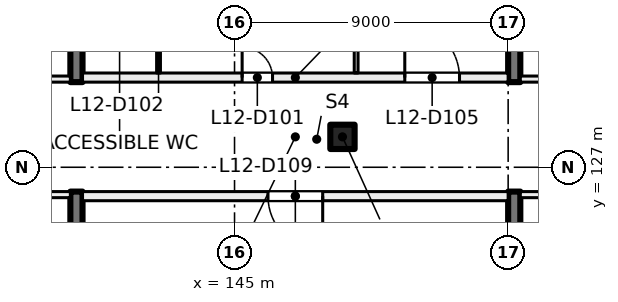
"""IFC4 building model, lengths in metres.
Left out: names, types, materials, properties, quantities, classifications, styles, units other than length and angle.
Written with IfcOpenShell. Run it as: python <this file> out.ifc"""

import sys

from ifc_helpers import new_model, si_unit, direction, frame, frame_2d, origin, origin_2d, place, context, subcontext, project, spatial, rectangle, extrude, element, fill, save


model = new_model("IFC4")
c1 = context("Model", 3, precision=1e-05, world=origin(), true_north=direction((0.0, 1.0)))
c2 = subcontext(c1, "Body", "Model", "MODEL_VIEW")
j1 = project(units=[si_unit("LENGTHUNIT", "METRE"), si_unit("PLANEANGLEUNIT", "RADIAN")], contexts=[c1])
p1 = place(None, origin())
s1 = spatial("IfcSite", under=j1, at=p1, CompositionType="ELEMENT")
p2 = place(p1, origin())
s2 = spatial("IfcBuilding", under=s1, at=p2, CompositionType="ELEMENT")
p3 = place(p2, frame((0.0, 0.0, 55.5)))
s3 = spatial("IfcBuildingStorey", under=s2, at=p3, CompositionType="ELEMENT", Elevation=55.5)
p4 = place(p3, frame((148.55, 128.0, 0.0), z_axis=(0.0, 0.0, 1.0), x_axis=(1.0, 0.0, 0.0)))
e1 = element("IfcColumn", 1, at=p4, inside=s3, PredefinedType="COLUMN", context=c2, shape_type="SweptSolid", body=[
    extrude(rectangle(XDim=0.8, YDim=0.8, at=origin_2d()), origin(), (0.0, 0.0, 1.0), 4.0),
])
for number, where, z_axis, x_axis in (
    (2, (139.8, 117.6, 0.0), (0.0, 0.0, 1.0), (0.0, 1.0, 0.0)),
    (3, (139.8, 129.8, 0.0), (0.0, 0.0, 1.0), (0.0, 1.0, 0.0)),
    (4, (154.2, 138.4, 0.0), (0.0, 0.0, 1.0), (0.0, -1.0, 0.0)),
    (5, (154.2, 126.2, 0.0), (0.0, 0.0, 1.0), (0.0, -1.0, 0.0)),
):
    element("IfcWall", number, at=place(p3, frame(where, z_axis=z_axis, x_axis=x_axis)), inside=s3, PredefinedType="SHEAR", context=c2, shape_type="SweptSolid", body=[
        extrude(rectangle(XDim=8.6, YDim=0.4, at=frame_2d((4.3, 0.0))), origin(), (0.0, 0.0, 1.0), 4.0),
    ])
p5 = place(p3, frame((135.0, 129.9, 0.0), z_axis=(0.0, 0.0, 1.0), x_axis=(1.0, 0.0, 0.0)))
e6 = element("IfcWall", 6, at=p5, inside=s3, PredefinedType="PARTITIONING", context=c2, shape_type="SweptSolid", body=[
    extrude(rectangle(XDim=4.6, YDim=0.2, at=frame_2d((2.3, 0.0))), origin(), (0.0, 0.0, 1.0), 3.625),
])
p6 = place(p5, frame((1.7, 0.0, 0.0)))
e7 = element("IfcOpeningElement", 7, at=p6, cuts=e6, PredefinedType="OPENING", context=c2, shape_type="SweptSolid", body=[
    extrude(rectangle(XDim=1.2, YDim=2.1, at=frame_2d((0.6, 1.05))), frame((0.0, 0.11, 0.0), z_axis=(0.0, -1.0, 0.0), x_axis=(1.0, 0.0, 0.0)), (0.0, 0.0, 1.0), 0.22),
])
p7 = place(p3, frame((139.6, 126.1, 0.0), z_axis=(0.0, 0.0, 1.0), x_axis=(-1.0, 0.0, 0.0)))
e8 = element("IfcWall", 8, at=p7, inside=s3, PredefinedType="PARTITIONING", context=c2, shape_type="SweptSolid", body=[
    extrude(rectangle(XDim=4.6, YDim=0.2, at=frame_2d((2.3, 0.0))), origin(), (0.0, 0.0, 1.0), 3.625),
])
p8 = place(p7, frame((1.7, 0.0, 0.0)))
e9 = element("IfcOpeningElement", 9, at=p8, cuts=e8, PredefinedType="OPENING", context=c2, shape_type="SweptSolid", body=[
    extrude(rectangle(XDim=1.2, YDim=2.1, at=frame_2d((0.6, 1.05))), frame((0.0, 0.11, 0.0), z_axis=(0.0, -1.0, 0.0), x_axis=(1.0, 0.0, 0.0)), (0.0, 0.0, 1.0), 0.22),
])
p9 = place(p3, frame((163.8, 126.1, 0.0), z_axis=(0.0, 0.0, 1.0), x_axis=(-1.0, 0.0, 0.0)))
e10 = element("IfcWall", 10, at=p9, inside=s3, PredefinedType="PARTITIONING", context=c2, shape_type="SweptSolid", body=[
    extrude(rectangle(XDim=9.4, YDim=0.2, at=frame_2d((4.7, 0.0))), origin(), (0.0, 0.0, 1.0), 3.625),
])
p10 = place(p9, frame((4.1, 0.0, 0.0)))
e11 = element("IfcOpeningElement", 11, at=p10, cuts=e10, PredefinedType="OPENING", context=c2, shape_type="SweptSolid", body=[
    extrude(rectangle(XDim=1.2, YDim=2.1, at=frame_2d((0.6, 1.05))), frame((0.0, 0.11, 0.0), z_axis=(0.0, -1.0, 0.0), x_axis=(1.0, 0.0, 0.0)), (0.0, 0.0, 1.0), 0.22),
])
p11 = place(p3, frame((154.4, 129.9, 0.0), z_axis=(0.0, 0.0, 1.0), x_axis=(1.0, 0.0, 0.0)))
e12 = element("IfcWall", 12, at=p11, inside=s3, PredefinedType="PARTITIONING", context=c2, shape_type="SweptSolid", body=[
    extrude(rectangle(XDim=9.4, YDim=0.2, at=frame_2d((4.7, 0.0))), origin(), (0.0, 0.0, 1.0), 3.625),
])
p12 = place(p11, frame((4.1, 0.0, 0.0)))
e13 = element("IfcOpeningElement", 13, at=p12, cuts=e12, PredefinedType="OPENING", context=c2, shape_type="SweptSolid", body=[
    extrude(rectangle(XDim=1.2, YDim=2.1, at=frame_2d((0.6, 1.05))), frame((0.0, 0.11, 0.0), z_axis=(0.0, -1.0, 0.0), x_axis=(1.0, 0.0, 0.0)), (0.0, 0.0, 1.0), 0.22),
])
p13 = place(p3, frame((140.0, 129.95, 0.0), z_axis=(0.0, 0.0, 1.0), x_axis=(1.0, 0.0, 0.0)))
e14 = element("IfcWall", 14, at=p13, inside=s3, PredefinedType="PARTITIONING", context=c2, shape_type="SweptSolid", body=[
    extrude(rectangle(XDim=14.0, YDim=0.3, at=frame_2d((7.0, 0.0))), origin(), (0.0, 0.0, 1.0), 3.625),
])
p14 = place(p13, frame((5.25, 0.0, 0.0)))
e15 = element("IfcOpeningElement", 15, at=p14, cuts=e14, PredefinedType="OPENING", context=c2, shape_type="SweptSolid", body=[
    extrude(rectangle(XDim=1.0, YDim=2.1, at=frame_2d((0.5, 1.05))), frame((0.0, 0.16, 0.0), z_axis=(0.0, -1.0, 0.0), x_axis=(1.0, 0.0, 0.0)), (0.0, 0.0, 1.0), 0.32),
])
p15 = place(p13, frame((10.6, 0.0, 0.0)))
e16 = element("IfcOpeningElement", 16, at=p15, cuts=e14, PredefinedType="OPENING", context=c2, shape_type="SweptSolid", body=[
    extrude(rectangle(XDim=1.8, YDim=2.1, at=frame_2d((0.9, 1.05))), frame((0.0, 0.16, 0.0), z_axis=(0.0, -1.0, 0.0), x_axis=(1.0, 0.0, 0.0)), (0.0, 0.0, 1.0), 0.32),
])
p16 = place(p3, frame((142.5, 130.1, 0.0), z_axis=(0.0, 0.0, 1.0), x_axis=(0.0, 1.0, 0.0)))
e17 = element("IfcWall", 17, at=p16, inside=s3, PredefinedType="PARTITIONING", context=c2, shape_type="SweptSolid", body=[
    extrude(rectangle(XDim=2.588, YDim=0.125, at=frame_2d((1.294, 0.0))), origin(), (0.0, 0.0, 1.0), 3.625),
])
p17 = place(p16, frame((0.794, 0.0, 0.0)))
e18 = element("IfcOpeningElement", 18, at=p17, cuts=e17, PredefinedType="OPENING", context=c2, shape_type="SweptSolid", body=[
    extrude(rectangle(XDim=1.0, YDim=2.1, at=frame_2d((0.5, 1.05))), frame((0.0, 0.073, 0.0), z_axis=(0.0, -1.0, 0.0), x_axis=(1.0, 0.0, 0.0)), (0.0, 0.0, 1.0), 0.145),
])
p18 = place(p3, frame((149.0, 139.012, 0.0), z_axis=(0.0, 0.0, 1.0), x_axis=(0.0, -1.0, 0.0)))
e19 = element("IfcWall", 19, at=p18, inside=s3, PredefinedType="PARTITIONING", context=c2, shape_type="SweptSolid", body=[
    extrude(rectangle(XDim=8.912, YDim=0.125, at=frame_2d((4.456, 0.0))), origin(), (0.0, 0.0, 1.0), 3.625),
])
p19 = place(p3, frame((154.0, 126.05, 0.0), z_axis=(0.0, 0.0, 1.0), x_axis=(-1.0, 0.0, 0.0)))
e20 = element("IfcWall", 20, at=p19, inside=s3, PredefinedType="PARTITIONING", context=c2, shape_type="SweptSolid", body=[
    extrude(rectangle(XDim=14.0, YDim=0.3, at=frame_2d((7.0, 0.0))), origin(), (0.0, 0.0, 1.0), 3.625),
])
p20 = place(p19, frame((6.1, 0.0, 0.0)))
e21 = element("IfcOpeningElement", 21, at=p20, cuts=e20, PredefinedType="OPENING", context=c2, shape_type="SweptSolid", body=[
    extrude(rectangle(XDim=1.8, YDim=2.1, at=frame_2d((0.9, 1.05))), frame((0.0, 0.16, 0.0), z_axis=(0.0, -1.0, 0.0), x_axis=(1.0, 0.0, 0.0)), (0.0, 0.0, 1.0), 0.32),
])
p21 = place(p14, origin())
e22 = element("IfcDoor", 22, at=p21, inside=s3, OperationType="SINGLE_SWING_RIGHT", PredefinedType="DOOR", context=c2, shape_type="SweptSolid", body=[
    extrude(rectangle(XDim=1.0, YDim=2.1, at=frame_2d((0.5, 1.05))), frame((0.0, 0.025, 0.0), z_axis=(0.0, -1.0, 0.0), x_axis=(1.0, 0.0, 0.0)), (0.0, 0.0, 1.0), 0.05),
])
fill(e15, e22)
p22 = place(p15, origin())
e23 = element("IfcDoor", 23, at=p22, inside=s3, OperationType="DOUBLE_DOOR_SINGLE_SWING", PredefinedType="DOOR", context=c2, shape_type="SweptSolid", body=[
    extrude(rectangle(XDim=1.8, YDim=2.1, at=frame_2d((0.9, 1.05))), frame((0.0, 0.025, 0.0), z_axis=(0.0, -1.0, 0.0), x_axis=(1.0, 0.0, 0.0)), (0.0, 0.0, 1.0), 0.05),
])
fill(e16, e23)
p23 = place(p20, origin())
e24 = element("IfcDoor", 24, at=p23, inside=s3, OperationType="DOUBLE_DOOR_SINGLE_SWING", PredefinedType="DOOR", context=c2, shape_type="SweptSolid", body=[
    extrude(rectangle(XDim=1.8, YDim=2.1, at=frame_2d((0.9, 1.05))), frame((0.0, 0.025, 0.0), z_axis=(0.0, -1.0, 0.0), x_axis=(1.0, 0.0, 0.0)), (0.0, 0.0, 1.0), 0.05),
])
fill(e21, e24)
save(model, sys.argv[1])
